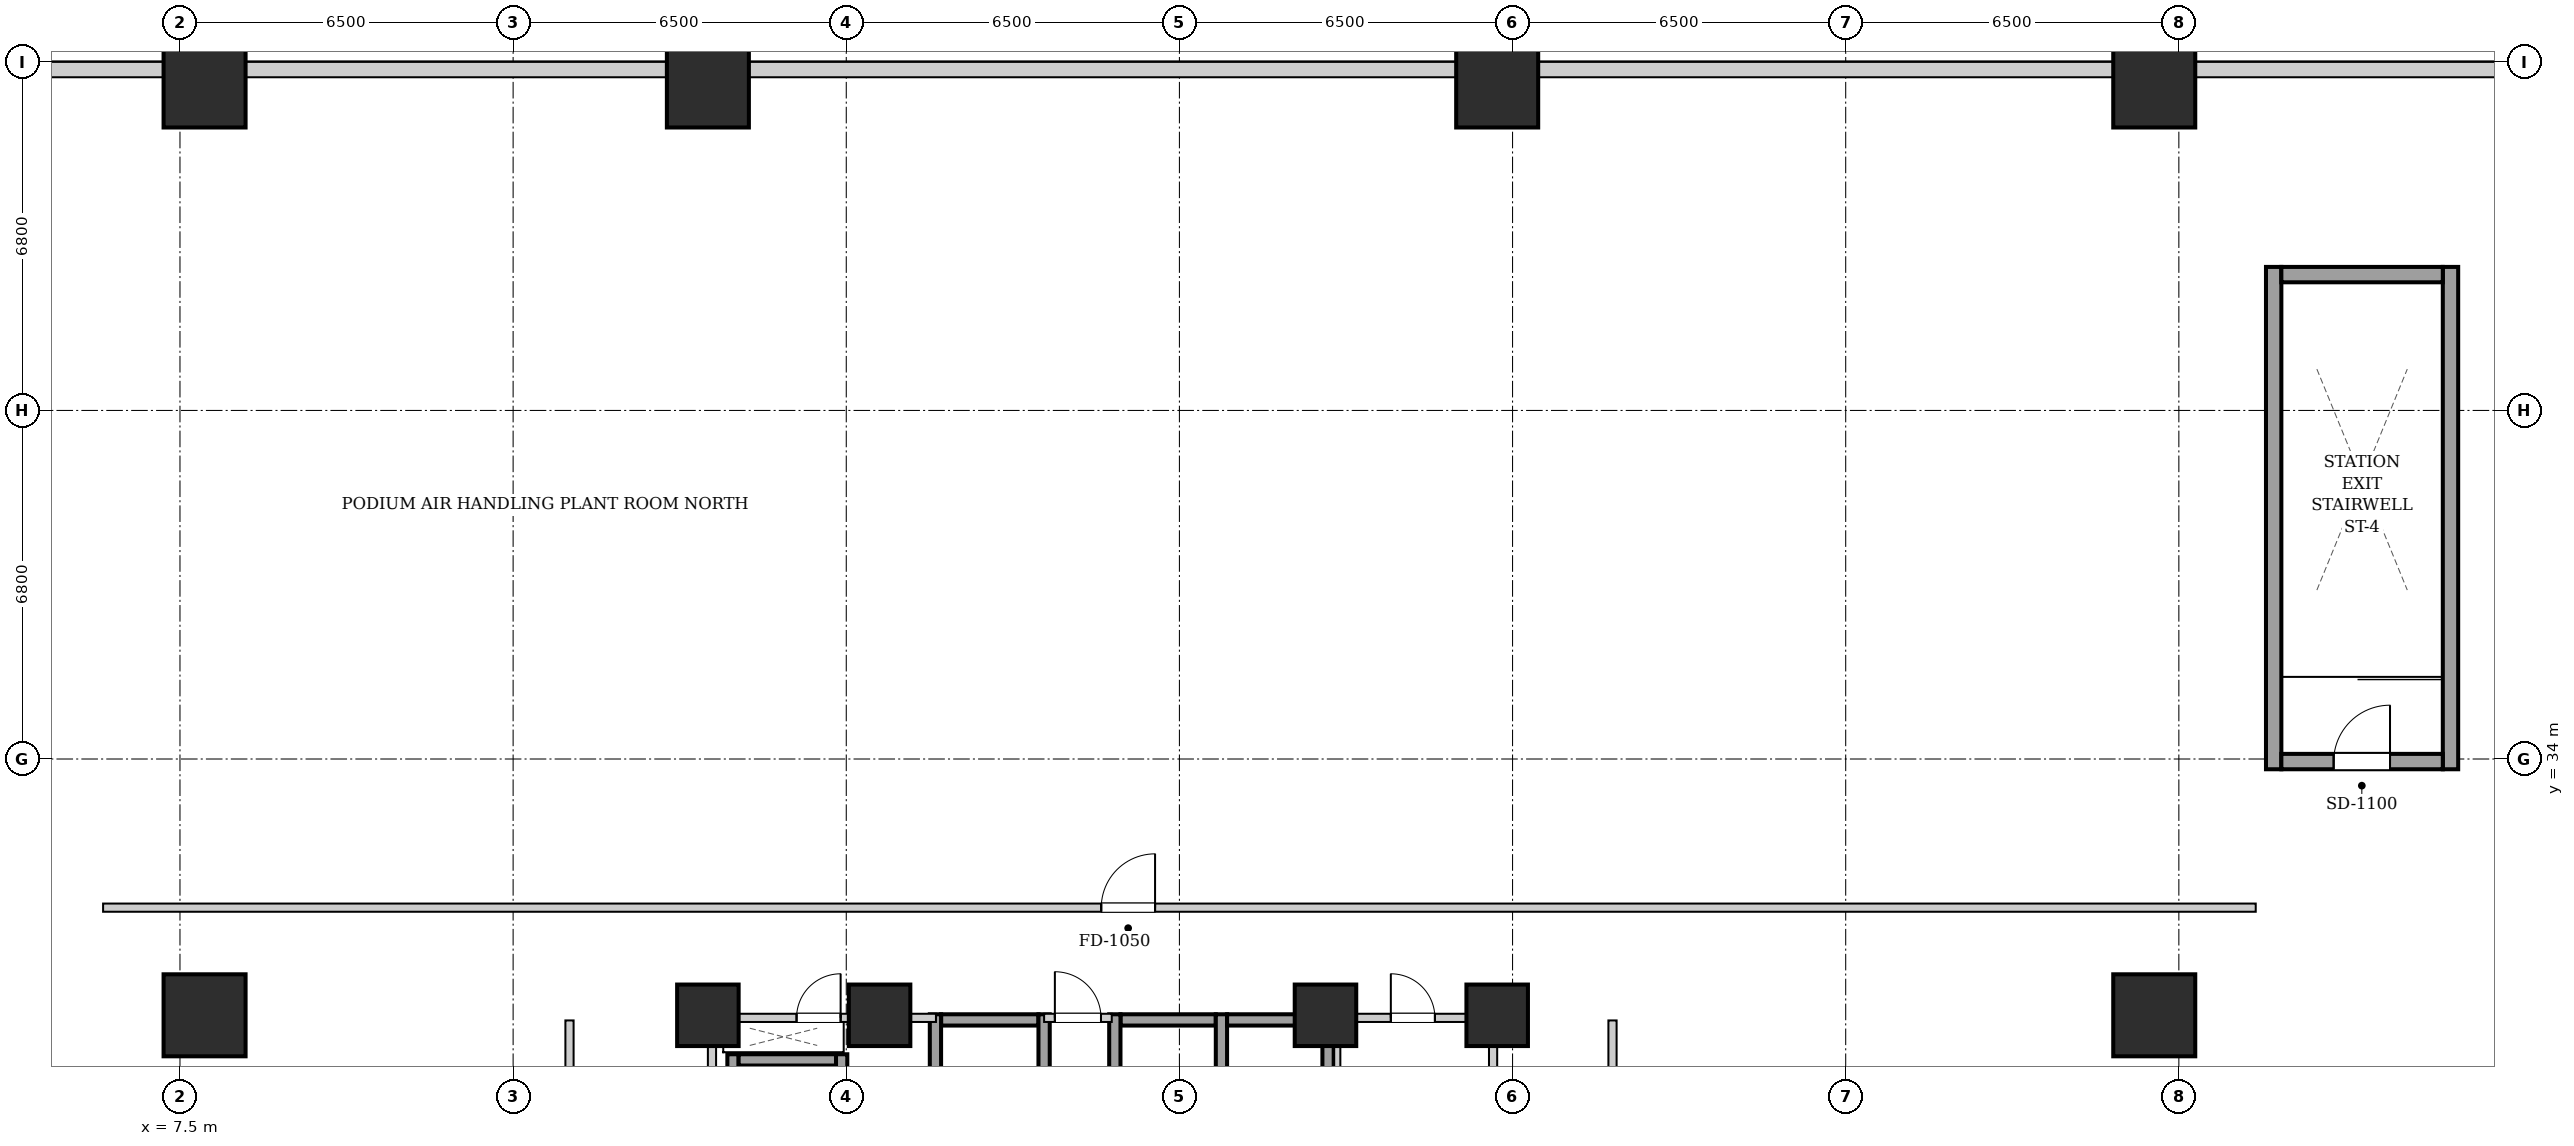
"""IFC4 building model, lengths in metres.
Left out: names, types, materials, properties, quantities, classifications, styles, units other than length and angle.
Written with IfcOpenShell. Run it as: python <this file> out.ifc"""

import sys

from ifc_helpers import new_model, si_unit, direction, frame, frame_2d, origin, origin_2d, place, context, subcontext, project, spatial, rectangle, extrude, element, fill, save


model = new_model("IFC4")
c1 = context("Model", 3, precision=1e-05, world=origin(), true_north=direction((0.0, 1.0)))
c2 = subcontext(c1, "Body", "Model", "MODEL_VIEW")
j1 = project(units=[si_unit("LENGTHUNIT", "METRE"), si_unit("PLANEANGLEUNIT", "RADIAN")], contexts=[c1])
p1 = place(None, origin())
s1 = spatial("IfcSite", under=j1, at=p1, CompositionType="ELEMENT")
p2 = place(p1, origin())
s2 = spatial("IfcBuilding", under=s1, at=p2, CompositionType="ELEMENT")
p3 = place(p2, frame((0.0, 0.0, 20.8)))
s3 = spatial("IfcBuildingStorey", under=s2, at=p3, CompositionType="ELEMENT", Elevation=20.8)
for number, where, z_axis, x_axis in (
    (1, (7.98, 29.0, 0.0), (0.0, 0.0, 1.0), (1.0, 0.0, 0.0)),
    (2, (7.98, 47.12, 0.0), (0.0, 0.0, 1.0), (1.0, 0.0, 0.0)),
    (3, (46.02, 29.0, 0.0), (0.0, 0.0, 1.0), (1.0, 0.0, 0.0)),
    (4, (46.02, 47.12, 0.0), (0.0, 0.0, 1.0), (1.0, 0.0, 0.0)),
    (5, (17.8, 47.12, 0.0), (0.0, 0.0, 1.0), (1.0, 0.0, 0.0)),
    (6, (33.2, 47.12, 0.0), (0.0, 0.0, 1.0), (1.0, 0.0, 0.0)),
):
    element("IfcColumn", number, at=place(p3, frame(where, z_axis=z_axis, x_axis=x_axis)), inside=s3, PredefinedType="COLUMN", context=c2, shape_type="SweptSolid", body=[
        extrude(rectangle(XDim=1.6, YDim=1.6, at=origin_2d()), origin(), (0.0, 0.0, 1.0), 5.0),
    ])
for number, where, z_axis, x_axis in (
    (7, (17.8, 29.0, 0.0), (0.0, 0.0, 1.0), (1.0, 0.0, 0.0)),
    (8, (21.15, 29.0, 0.0), (0.0, 0.0, 1.0), (1.0, 0.0, 0.0)),
    (9, (29.85, 29.0, 0.0), (0.0, 0.0, 1.0), (1.0, 0.0, 0.0)),
    (10, (33.2, 29.0, 0.0), (0.0, 0.0, 1.0), (1.0, 0.0, 0.0)),
):
    element("IfcColumn", number, at=place(p3, frame(where, z_axis=z_axis, x_axis=x_axis)), inside=s3, PredefinedType="COLUMN", context=c2, shape_type="SweptSolid", body=[
        extrude(rectangle(XDim=1.2, YDim=1.2, at=origin_2d()), origin(), (0.0, 0.0, 1.0), 5.0),
    ])
p4 = place(p3, frame((0.16, 47.45, 0.0), z_axis=(0.0, 0.0, 1.0), x_axis=(1.0, 0.0, 0.0)))
e11 = element("IfcWall", 11, at=p4, inside=s3, PredefinedType="SOLIDWALL", context=c2, shape_type="SweptSolid", body=[
    extrude(rectangle(XDim=53.68, YDim=0.3, at=frame_2d((26.84, 0.0))), origin(), (0.0, 0.0, 1.0), 2.525),
])
for number, where, z_axis, x_axis in (
    (12, (48.35, 33.8, 0.0), (0.0, 0.0, 1.0), (0.0, 1.0, 0.0)),
    (13, (51.8, 33.8, 0.0), (0.0, 0.0, 1.0), (0.0, 1.0, 0.0)),
):
    element("IfcWall", number, at=place(p3, frame(where, z_axis=z_axis, x_axis=x_axis)), inside=s3, PredefinedType="SHEAR", context=c2, shape_type="SweptSolid", body=[
        extrude(rectangle(XDim=9.8, YDim=0.3, at=frame_2d((4.9, 0.0))), origin(), (0.0, 0.0, 1.0), 4.74),
    ])
p5 = place(p3, frame((48.5, 43.45, 0.0), z_axis=(0.0, 0.0, 1.0), x_axis=(1.0, 0.0, 0.0)))
e14 = element("IfcWall", 14, at=p5, inside=s3, PredefinedType="SHEAR", context=c2, shape_type="SweptSolid", body=[
    extrude(rectangle(XDim=3.15, YDim=0.3, at=frame_2d((1.575, 0.0))), origin(), (0.0, 0.0, 1.0), 4.74),
])
p6 = place(p3, frame((48.5, 33.95, 0.0), z_axis=(0.0, 0.0, 1.0), x_axis=(1.0, 0.0, 0.0)))
e15 = element("IfcWall", 15, at=p6, inside=s3, PredefinedType="SHEAR", context=c2, shape_type="SweptSolid", body=[
    extrude(rectangle(XDim=3.15, YDim=0.3, at=frame_2d((1.575, 0.0))), origin(), (0.0, 0.0, 1.0), 4.74),
])
p7 = place(p6, frame((1.02, 0.0, 0.0)))
e16 = element("IfcOpeningElement", 16, at=p7, cuts=e15, PredefinedType="OPENING", context=c2, shape_type="SweptSolid", body=[
    extrude(rectangle(XDim=1.1, YDim=2.05, at=frame_2d((0.55, 1.025))), frame((0.0, 0.16, 0.0), z_axis=(0.0, -1.0, 0.0), x_axis=(1.0, 0.0, 0.0)), (0.0, 0.0, 1.0), 0.32),
])
p8 = place(p3, frame((22.35, 28.91, 0.0), z_axis=(0.0, 0.0, 1.0), x_axis=(1.0, 0.0, 0.0)))
e17 = element("IfcWall", 17, at=p8, inside=s3, PredefinedType="SHEAR", context=c2, shape_type="SweptSolid", body=[
    extrude(rectangle(XDim=1.9, YDim=0.22, at=frame_2d((0.95, 0.0))), origin(), (0.0, 0.0, 1.0), 4.74),
])
for number, where, z_axis, x_axis in (
    (18, (22.24, 26.58, 0.0), (0.0, 0.0, 1.0), (0.0, 1.0, 0.0)),
    (19, (24.36, 26.58, 0.0), (0.0, 0.0, 1.0), (0.0, 1.0, 0.0)),
):
    element("IfcWall", number, at=place(p3, frame(where, z_axis=z_axis, x_axis=x_axis)), inside=s3, PredefinedType="SHEAR", context=c2, shape_type="SweptSolid", body=[
        extrude(rectangle(XDim=2.44, YDim=0.22, at=frame_2d((1.22, 0.0))), origin(), (0.0, 0.0, 1.0), 4.74),
    ])
p9 = place(p3, frame((25.85, 28.91, 0.0), z_axis=(0.0, 0.0, 1.0), x_axis=(1.0, 0.0, 0.0)))
e20 = element("IfcWall", 20, at=p9, inside=s3, PredefinedType="SHEAR", context=c2, shape_type="SweptSolid", body=[
    extrude(rectangle(XDim=1.86, YDim=0.22, at=frame_2d((0.93, 0.0))), origin(), (0.0, 0.0, 1.0), 4.74),
])
for number, where, z_axis, x_axis in (
    (21, (25.74, 26.58, 0.0), (0.0, 0.0, 1.0), (0.0, 1.0, 0.0)),
    (22, (27.82, 26.58, 0.0), (0.0, 0.0, 1.0), (0.0, 1.0, 0.0)),
):
    element("IfcWall", number, at=place(p3, frame(where, z_axis=z_axis, x_axis=x_axis)), inside=s3, PredefinedType="SHEAR", context=c2, shape_type="SweptSolid", body=[
        extrude(rectangle(XDim=2.44, YDim=0.22, at=frame_2d((1.22, 0.0))), origin(), (0.0, 0.0, 1.0), 4.74),
    ])
p10 = place(p3, frame((27.93, 28.91, 0.0), z_axis=(0.0, 0.0, 1.0), x_axis=(1.0, 0.0, 0.0)))
e23 = element("IfcWall", 23, at=p10, inside=s3, PredefinedType="SHEAR", context=c2, shape_type="SweptSolid", body=[
    extrude(rectangle(XDim=1.86, YDim=0.22, at=frame_2d((0.93, 0.0))), origin(), (0.0, 0.0, 1.0), 4.74),
])
p11 = place(p3, frame((29.9, 26.58, 0.0), z_axis=(0.0, 0.0, 1.0), x_axis=(0.0, 1.0, 0.0)))
e24 = element("IfcWall", 24, at=p11, inside=s3, PredefinedType="SHEAR", context=c2, shape_type="SweptSolid", body=[
    extrude(rectangle(XDim=2.44, YDim=0.22, at=frame_2d((1.22, 0.0))), origin(), (0.0, 0.0, 1.0), 4.74),
])
p12 = place(p3, frame((18.29, 24.1, 0.0), z_axis=(0.0, 0.0, 1.0), x_axis=(0.0, 1.0, 0.0)))
e25 = element("IfcWall", 25, at=p12, inside=s3, PredefinedType="SHEAR", context=c2, shape_type="SweptSolid", body=[
    extrude(rectangle(XDim=4.14, YDim=0.22, at=frame_2d((2.07, 0.0))), origin(), (0.0, 0.0, 1.0), 4.74),
])
p13 = place(p3, frame((18.4, 28.13, 0.0), z_axis=(0.0, 0.0, 1.0), x_axis=(1.0, 0.0, 0.0)))
e26 = element("IfcWall", 26, at=p13, inside=s3, PredefinedType="SHEAR", context=c2, shape_type="SweptSolid", body=[
    extrude(rectangle(XDim=1.9, YDim=0.22, at=frame_2d((0.95, 0.0))), origin(), (0.0, 0.0, 1.0), 4.74),
])
p14 = place(p3, frame((20.41, 26.06, 0.0), z_axis=(0.0, 0.0, 1.0), x_axis=(0.0, 1.0, 0.0)))
e27 = element("IfcWall", 27, at=p14, inside=s3, PredefinedType="SHEAR", context=c2, shape_type="SweptSolid", body=[
    extrude(rectangle(XDim=2.18, YDim=0.22, at=frame_2d((1.09, 0.0))), origin(), (0.0, 0.0, 1.0), 4.74),
])
for number, where, z_axis, x_axis in (
    (28, (17.88, 24.12, 0.0), (0.0, 0.0, 1.0), (0.0, 1.0, 0.0)),
    (29, (33.12, 24.12, 0.0), (0.0, 0.0, 1.0), (0.0, 1.0, 0.0)),
):
    element("IfcWall", number, at=place(p3, frame(where, z_axis=z_axis, x_axis=x_axis)), inside=s3, PredefinedType="PARTITIONING", context=c2, shape_type="SweptSolid", body=[
        extrude(rectangle(XDim=4.76, YDim=0.16, at=frame_2d((2.38, 0.0))), origin(), (0.0, 0.0, 1.0), 4.74),
    ])
p15 = place(p3, frame((24.36, 28.95, 0.0), z_axis=(0.0, 0.0, 1.0), x_axis=(1.0, 0.0, 0.0)))
e30 = element("IfcWall", 30, at=p15, inside=s3, PredefinedType="PARTITIONING", context=c2, shape_type="SweptSolid", body=[
    extrude(rectangle(XDim=1.32, YDim=0.16, at=frame_2d((0.66, 0.0))), origin(), (0.0, 0.0, 1.0), 4.74),
])
p16 = place(p15, frame((0.21, 0.0, 0.0)))
e31 = element("IfcOpeningElement", 31, at=p16, cuts=e30, PredefinedType="OPENING", context=c2, shape_type="SweptSolid", body=[
    extrude(rectangle(XDim=0.9, YDim=2.05, at=frame_2d((0.45, 1.025))), frame((0.0, 0.09, 0.0), z_axis=(0.0, -1.0, 0.0), x_axis=(1.0, 0.0, 0.0)), (0.0, 0.0, 1.0), 0.18),
])
p17 = place(p3, frame((17.96, 28.95, 0.0), z_axis=(0.0, 0.0, 1.0), x_axis=(1.0, 0.0, 0.0)))
e32 = element("IfcWall", 32, at=p17, inside=s3, PredefinedType="PARTITIONING", context=c2, shape_type="SweptSolid", body=[
    extrude(rectangle(XDim=4.29, YDim=0.16, at=frame_2d((2.145, 0.0))), origin(), (0.0, 0.0, 1.0), 4.74),
])
p18 = place(p17, frame((1.57, 0.0, 0.0)))
e33 = element("IfcOpeningElement", 33, at=p18, cuts=e32, PredefinedType="OPENING", context=c2, shape_type="SweptSolid", body=[
    extrude(rectangle(XDim=0.86, YDim=2.05, at=frame_2d((0.43, 1.025))), frame((0.0, 0.09, 0.0), z_axis=(0.0, -1.0, 0.0), x_axis=(1.0, 0.0, 0.0)), (0.0, 0.0, 1.0), 0.18),
])
p19 = place(p3, frame((30.08, 26.18, 0.0), z_axis=(0.0, 0.0, 1.0), x_axis=(0.0, 1.0, 0.0)))
e34 = element("IfcWall", 34, at=p19, inside=s3, PredefinedType="PARTITIONING", context=c2, shape_type="SweptSolid", body=[
    extrude(rectangle(XDim=2.68, YDim=0.12, at=frame_2d((1.34, 0.0))), origin(), (0.0, 0.0, 1.0), 4.74),
])
p20 = place(p3, frame((30.08, 28.95, 0.0), z_axis=(0.0, 0.0, 1.0), x_axis=(1.0, 0.0, 0.0)))
e35 = element("IfcWall", 35, at=p20, inside=s3, PredefinedType="PARTITIONING", context=c2, shape_type="SweptSolid", body=[
    extrude(rectangle(XDim=2.96, YDim=0.16, at=frame_2d((1.48, 0.0))), origin(), (0.0, 0.0, 1.0), 4.74),
])
p21 = place(p20, frame((1.045, 0.0, 0.0)))
e36 = element("IfcOpeningElement", 36, at=p21, cuts=e35, PredefinedType="OPENING", context=c2, shape_type="SweptSolid", body=[
    extrude(rectangle(XDim=0.86, YDim=2.05, at=frame_2d((0.43, 1.025))), frame((0.0, 0.09, 0.0), z_axis=(0.0, -1.0, 0.0), x_axis=(1.0, 0.0, 0.0)), (0.0, 0.0, 1.0), 0.18),
])
p22 = place(p3, frame((6.0, 31.1, 0.0), z_axis=(0.0, 0.0, 1.0), x_axis=(1.0, 0.0, 0.0)))
e37 = element("IfcWall", 37, at=p22, inside=s3, PredefinedType="PARTITIONING", context=c2, shape_type="SweptSolid", body=[
    extrude(rectangle(XDim=42.0, YDim=0.16, at=frame_2d((21.0, 0.0))), origin(), (0.0, 0.0, 1.0), 4.74),
])
p23 = place(p22, frame((19.475, 0.0, 0.0)))
e38 = element("IfcOpeningElement", 38, at=p23, cuts=e37, PredefinedType="OPENING", context=c2, shape_type="SweptSolid", body=[
    extrude(rectangle(XDim=1.05, YDim=2.05, at=frame_2d((0.525, 1.025))), frame((0.0, 0.09, 0.0), z_axis=(0.0, -1.0, 0.0), x_axis=(1.0, 0.0, 0.0)), (0.0, 0.0, 1.0), 0.18),
])
p24 = place(p3, frame((15.1, 15.1, 0.0), z_axis=(0.0, 0.0, 1.0), x_axis=(0.0, 1.0, 0.0)))
e39 = element("IfcWall", 39, at=p24, inside=s3, PredefinedType="PARTITIONING", context=c2, shape_type="SweptSolid", body=[
    extrude(rectangle(XDim=13.8, YDim=0.16, at=frame_2d((6.9, 0.0))), origin(), (0.0, 0.0, 1.0), 4.74),
])
p25 = place(p24, frame((6.475, 0.0, 0.0)))
e40 = element("IfcOpeningElement", 40, at=p25, cuts=e39, PredefinedType="OPENING", context=c2, shape_type="SweptSolid", body=[
    extrude(rectangle(XDim=1.05, YDim=2.05, at=frame_2d((0.525, 1.025))), frame((0.0, 0.09, 0.0), z_axis=(0.0, -1.0, 0.0), x_axis=(1.0, 0.0, 0.0)), (0.0, 0.0, 1.0), 0.18),
])
p26 = place(p3, frame((35.45, 15.1, 0.0), z_axis=(0.0, 0.0, 1.0), x_axis=(0.0, 1.0, 0.0)))
e41 = element("IfcWall", 41, at=p26, inside=s3, PredefinedType="PARTITIONING", context=c2, shape_type="SweptSolid", body=[
    extrude(rectangle(XDim=13.8, YDim=0.16, at=frame_2d((6.9, 0.0))), origin(), (0.0, 0.0, 1.0), 4.74),
])
p27 = place(p26, frame((6.475, 0.0, 0.0)))
e42 = element("IfcOpeningElement", 42, at=p27, cuts=e41, PredefinedType="OPENING", context=c2, shape_type="SweptSolid", body=[
    extrude(rectangle(XDim=1.05, YDim=2.05, at=frame_2d((0.525, 1.025))), frame((0.0, 0.09, 0.0), z_axis=(0.0, -1.0, 0.0), x_axis=(1.0, 0.0, 0.0)), (0.0, 0.0, 1.0), 0.18),
])
p28 = place(p7, origin())
e43 = element("IfcDoor", 43, at=p28, inside=s3, OperationType="SINGLE_SWING_RIGHT", PredefinedType="DOOR", context=c2, shape_type="SweptSolid", body=[
    extrude(rectangle(XDim=1.1, YDim=2.05, at=frame_2d((0.55, 1.025))), frame((0.0, 0.025, 0.0), z_axis=(0.0, -1.0, 0.0), x_axis=(1.0, 0.0, 0.0)), (0.0, 0.0, 1.0), 0.05),
])
fill(e16, e43)
p29 = place(p16, origin())
e44 = element("IfcDoor", 44, at=p29, inside=s3, OperationType="SINGLE_SWING_LEFT", PredefinedType="DOOR", context=c2, shape_type="SweptSolid", body=[
    extrude(rectangle(XDim=0.9, YDim=2.05, at=frame_2d((0.45, 1.025))), frame((0.0, 0.025, 0.0), z_axis=(0.0, -1.0, 0.0), x_axis=(1.0, 0.0, 0.0)), (0.0, 0.0, 1.0), 0.05),
])
fill(e31, e44)
p30 = place(p18, origin())
e45 = element("IfcDoor", 45, at=p30, inside=s3, OperationType="SINGLE_SWING_RIGHT", PredefinedType="DOOR", context=c2, shape_type="SweptSolid", body=[
    extrude(rectangle(XDim=0.86, YDim=2.05, at=frame_2d((0.43, 1.025))), frame((0.0, 0.025, 0.0), z_axis=(0.0, -1.0, 0.0), x_axis=(1.0, 0.0, 0.0)), (0.0, 0.0, 1.0), 0.05),
])
fill(e33, e45)
p31 = place(p21, origin())
e46 = element("IfcDoor", 46, at=p31, inside=s3, OperationType="SINGLE_SWING_LEFT", PredefinedType="DOOR", context=c2, shape_type="SweptSolid", body=[
    extrude(rectangle(XDim=0.86, YDim=2.05, at=frame_2d((0.43, 1.025))), frame((0.0, 0.025, 0.0), z_axis=(0.0, -1.0, 0.0), x_axis=(1.0, 0.0, 0.0)), (0.0, 0.0, 1.0), 0.05),
])
fill(e36, e46)
p32 = place(p23, origin())
e47 = element("IfcDoor", 47, at=p32, inside=s3, OperationType="SINGLE_SWING_RIGHT", PredefinedType="DOOR", context=c2, shape_type="SweptSolid", body=[
    extrude(rectangle(XDim=1.05, YDim=2.05, at=frame_2d((0.525, 1.025))), frame((0.0, 0.025, 0.0), z_axis=(0.0, -1.0, 0.0), x_axis=(1.0, 0.0, 0.0)), (0.0, 0.0, 1.0), 0.05),
])
fill(e38, e47)
save(model, sys.argv[1])
